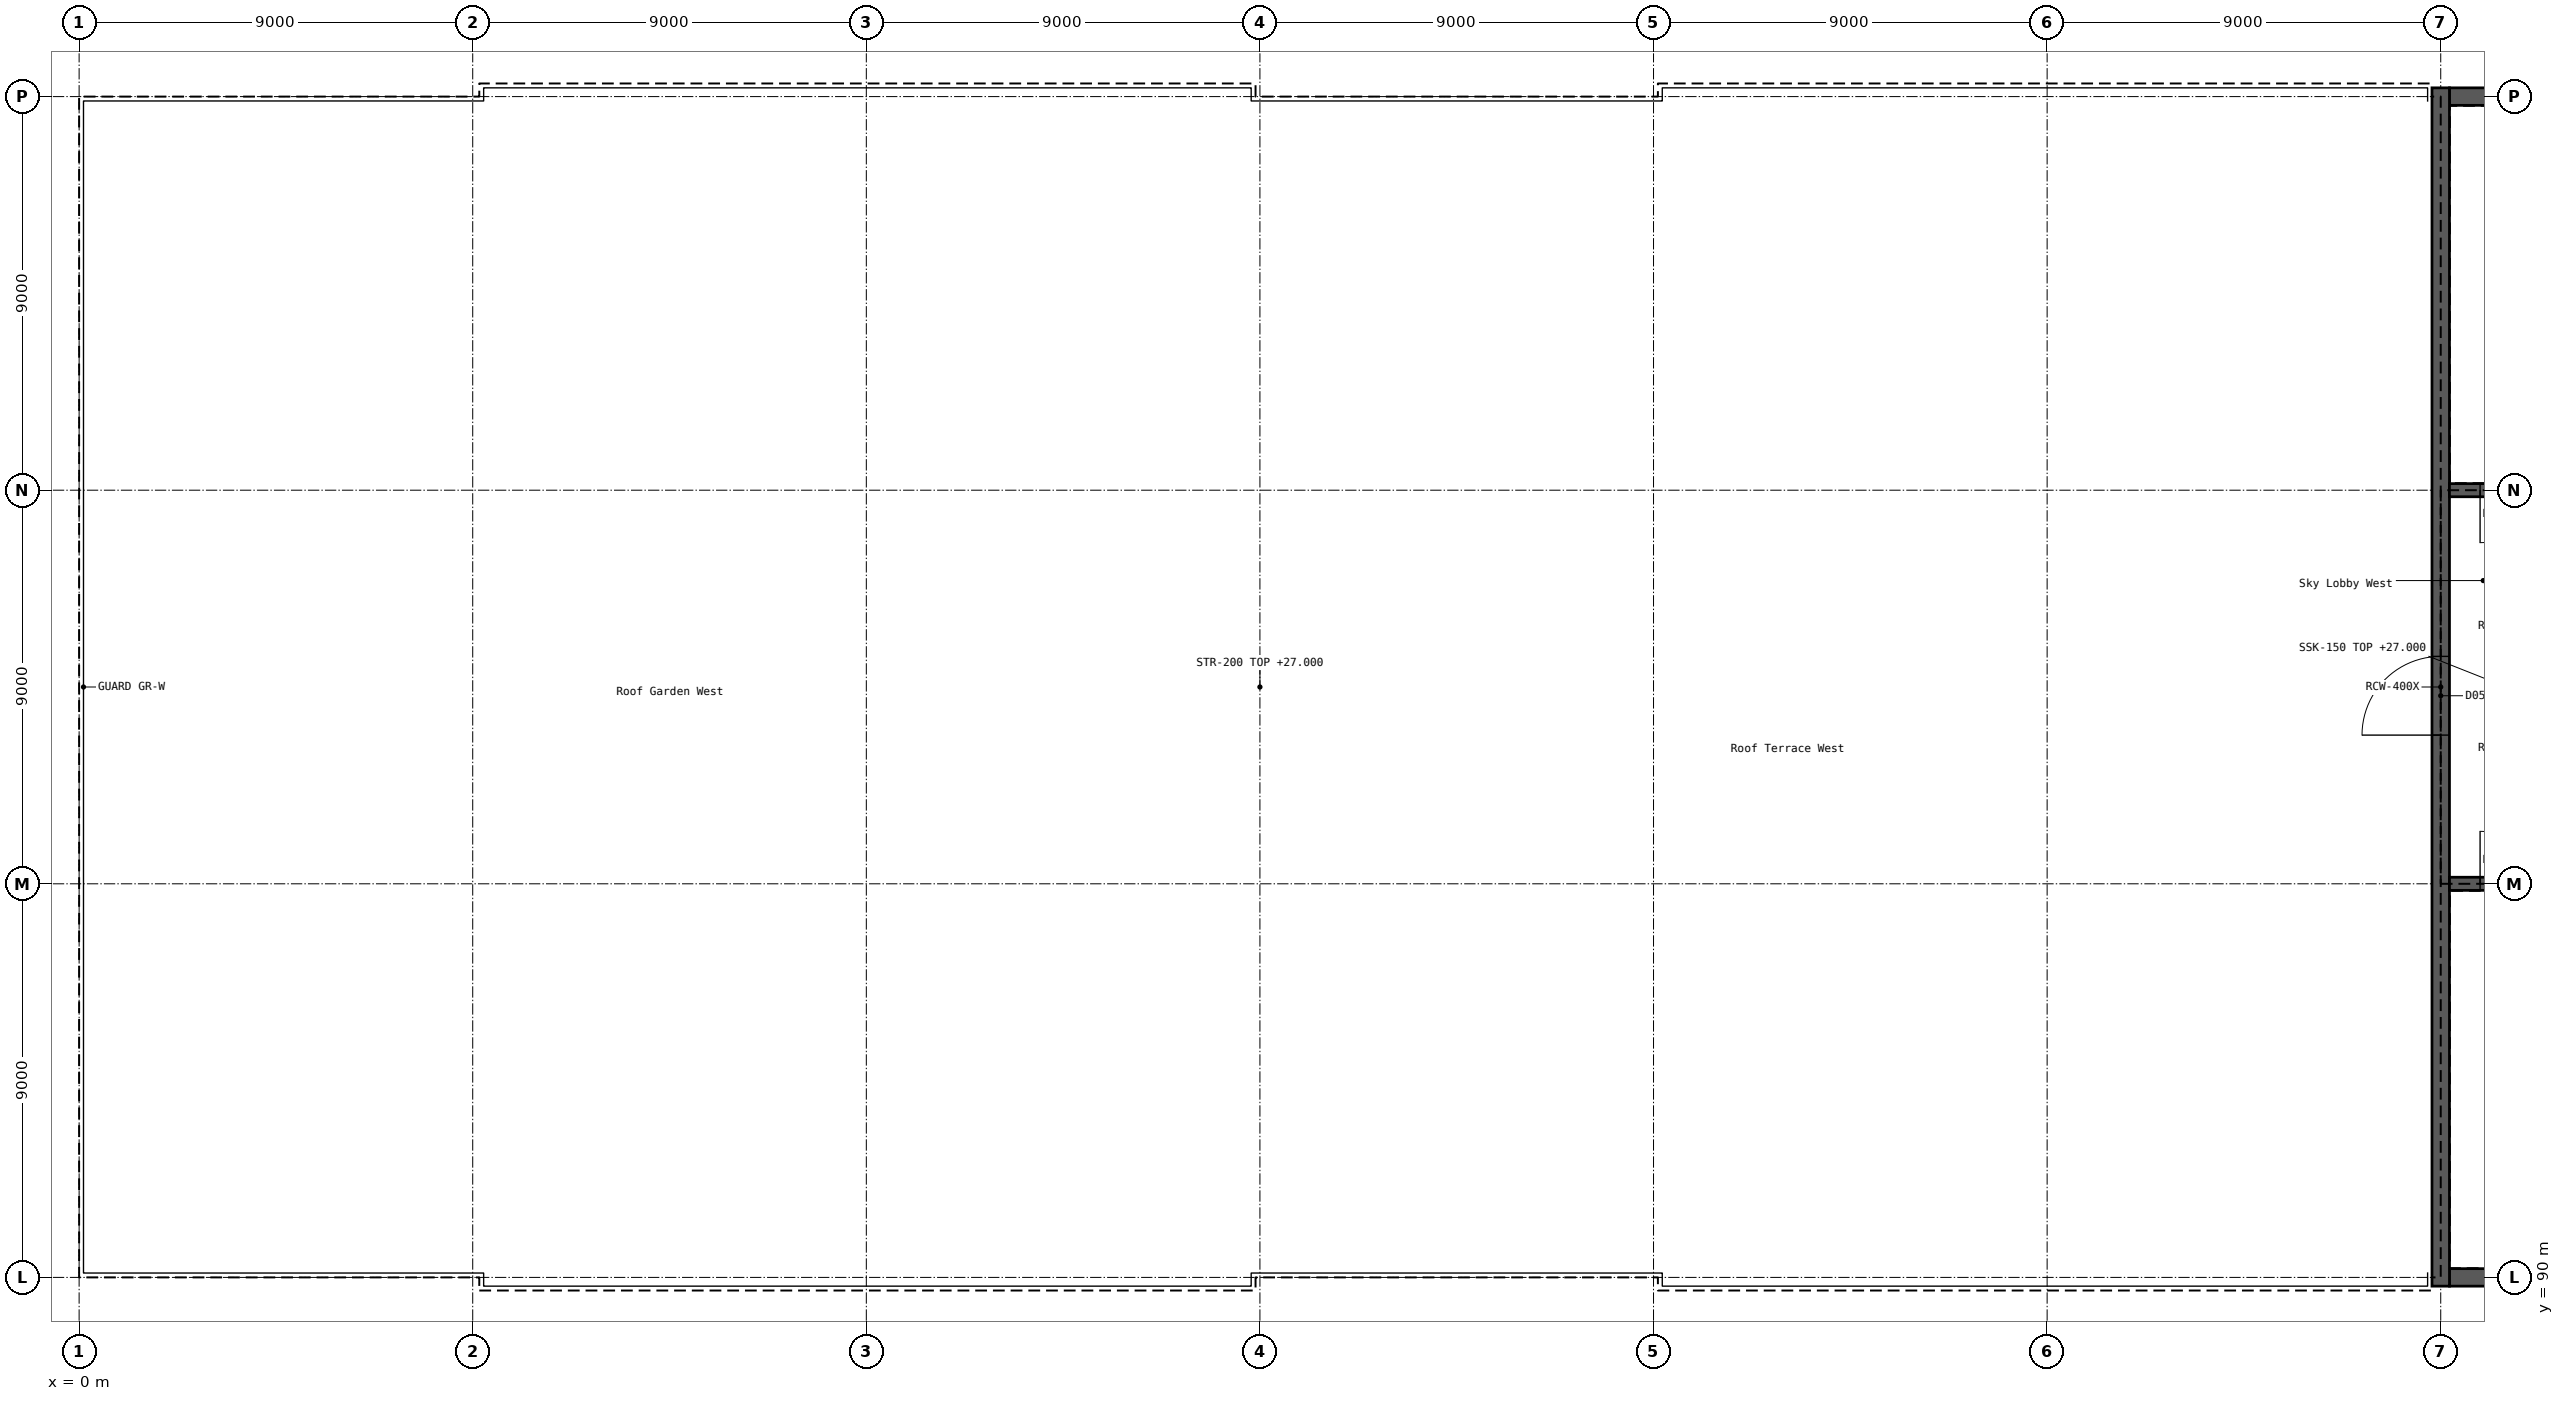
"""IFC4 building model, lengths in metres.
Left out: names, types, materials, properties, quantities, classifications, styles, units other than length and angle.
Written with IfcOpenShell. Run it as: python <this file> out.ifc"""

import sys

from ifc_helpers import new_model, si_unit, direction, frame, frame_2d, origin, place, context, subcontext, project, spatial, rectangle, extrude, element, fill, save


model = new_model("IFC4")
c1 = context("Model", 3, precision=1e-05, world=origin(), true_north=direction((0.0, 1.0)))
c2 = subcontext(c1, "Body", "Model", "MODEL_VIEW")
j1 = project(units=[si_unit("LENGTHUNIT", "METRE"), si_unit("PLANEANGLEUNIT", "RADIAN")], contexts=[c1])
p1 = place(None, origin())
s1 = spatial("IfcSite", under=j1, at=p1, CompositionType="ELEMENT")
p2 = place(p1, origin())
s2 = spatial("IfcBuilding", under=s1, at=p2, CompositionType="ELEMENT")
p3 = place(p2, frame((0.0, 0.0, 27.0)))
s3 = spatial("IfcBuildingStorey", under=s2, at=p3, CompositionType="ELEMENT", Elevation=27.0)
p4 = place(p3, frame((54.2, 90.0, 0.0), z_axis=(0.0, 0.0, 1.0), x_axis=(1.0, 0.0, 0.0)))
e1 = element("IfcWall", 1, at=p4, inside=s3, PredefinedType="SHEAR", context=c2, shape_type="SweptSolid", body=[
    extrude(rectangle(XDim=8.6, YDim=0.4, at=frame_2d((4.3, 0.0))), origin(), (0.0, 0.0, 1.0), 5.4),
])
p5 = place(p4, frame((3.75, 0.0, 1.5)))
e2 = element("IfcOpeningElement", 2, at=p5, cuts=e1, PredefinedType="OPENING", context=c2, shape_type="SweptSolid", body=[
    extrude(rectangle(XDim=1.5, YDim=1.8, at=frame_2d((0.75, 0.9))), frame((0.0, 0.211, 0.0), z_axis=(0.0, -1.0, 0.0), x_axis=(1.0, 0.0, 0.0)), (0.0, 0.0, 1.0), 0.422),
])
p6 = place(p3, frame((54.2, 117.0, 0.0), z_axis=(0.0, 0.0, 1.0), x_axis=(1.0, 0.0, 0.0)))
e3 = element("IfcWall", 3, at=p6, inside=s3, PredefinedType="SHEAR", context=c2, shape_type="SweptSolid", body=[
    extrude(rectangle(XDim=8.6, YDim=0.4, at=frame_2d((4.3, 0.0))), origin(), (0.0, 0.0, 1.0), 5.4),
])
p7 = place(p6, frame((3.75, 0.0, 1.5)))
e4 = element("IfcOpeningElement", 4, at=p7, cuts=e3, PredefinedType="OPENING", context=c2, shape_type="SweptSolid", body=[
    extrude(rectangle(XDim=1.5, YDim=1.8, at=frame_2d((0.75, 0.9))), frame((0.0, 0.211, 0.0), z_axis=(0.0, -1.0, 0.0), x_axis=(1.0, 0.0, 0.0)), (0.0, 0.0, 1.0), 0.422),
])
p8 = place(p3, frame((54.0, 89.8, 0.0), z_axis=(0.0, 0.0, 1.0), x_axis=(0.0, 1.0, 0.0)))
e5 = element("IfcWall", 5, at=p8, inside=s3, PredefinedType="SHEAR", context=c2, shape_type="SweptSolid", body=[
    extrude(rectangle(XDim=27.4, YDim=0.4, at=frame_2d((13.7, 0.0))), origin(), (0.0, 0.0, 1.0), 5.4),
])
p9 = place(p8, frame((12.6, 0.0, 0.0)))
e6 = element("IfcOpeningElement", 6, at=p9, cuts=e5, PredefinedType="OPENING", context=c2, shape_type="SweptSolid", body=[
    extrude(rectangle(XDim=1.8, YDim=2.1, at=frame_2d((0.9, 1.05))), frame((0.0, 0.211, 0.0), z_axis=(0.0, -1.0, 0.0), x_axis=(1.0, 0.0, 0.0)), (0.0, 0.0, 1.0), 0.422),
])
p10 = place(p3, frame((54.2, 99.0, 0.0), z_axis=(0.0, 0.0, 1.0), x_axis=(1.0, 0.0, 0.0)))
e7 = element("IfcWall", 7, at=p10, inside=s3, PredefinedType="SHEAR", context=c2, shape_type="SweptSolid", body=[
    extrude(rectangle(XDim=8.6, YDim=0.3, at=frame_2d((4.3, 0.0))), origin(), (0.0, 0.0, 1.0), 5.4),
])
p11 = place(p10, frame((0.7, 0.0, 0.0)))
e8 = element("IfcOpeningElement", 8, at=p11, cuts=e7, PredefinedType="OPENING", context=c2, shape_type="SweptSolid", body=[
    extrude(rectangle(XDim=1.2, YDim=2.1, at=frame_2d((0.6, 1.05))), frame((0.0, 0.161, 0.0), z_axis=(0.0, -1.0, 0.0), x_axis=(1.0, 0.0, 0.0)), (0.0, 0.0, 1.0), 0.322),
])
p12 = place(p3, frame((54.2, 108.0, 0.0), z_axis=(0.0, 0.0, 1.0), x_axis=(1.0, 0.0, 0.0)))
e9 = element("IfcWall", 9, at=p12, inside=s3, PredefinedType="SHEAR", context=c2, shape_type="SweptSolid", body=[
    extrude(rectangle(XDim=8.6, YDim=0.3, at=frame_2d((4.3, 0.0))), origin(), (0.0, 0.0, 1.0), 5.4),
])
p13 = place(p12, frame((0.7, 0.0, 0.0)))
e10 = element("IfcOpeningElement", 10, at=p13, cuts=e9, PredefinedType="OPENING", context=c2, shape_type="SweptSolid", body=[
    extrude(rectangle(XDim=1.2, YDim=2.1, at=frame_2d((0.6, 1.05))), frame((0.0, 0.161, 0.0), z_axis=(0.0, -1.0, 0.0), x_axis=(1.0, 0.0, 0.0)), (0.0, 0.0, 1.0), 0.322),
])
p14 = place(p9, origin())
e11 = element("IfcDoor", 11, at=p14, inside=s3, OperationType="DOUBLE_DOOR_DOUBLE_SWING", PredefinedType="DOOR", context=c2, shape_type="SweptSolid", body=[
    extrude(rectangle(XDim=1.8, YDim=2.1, at=frame_2d((0.9, 1.05))), frame((0.0, 0.025, 0.0), z_axis=(0.0, -1.0, 0.0), x_axis=(1.0, 0.0, 0.0)), (0.0, 0.0, 1.0), 0.05),
])
fill(e6, e11)
p15 = place(p11, origin())
e12 = element("IfcDoor", 12, at=p15, inside=s3, OperationType="SINGLE_SWING_LEFT", PredefinedType="DOOR", context=c2, shape_type="SweptSolid", body=[
    extrude(rectangle(XDim=1.2, YDim=2.1, at=frame_2d((0.6, 1.05))), frame((0.0, 0.025, 0.0), z_axis=(0.0, -1.0, 0.0), x_axis=(1.0, 0.0, 0.0)), (0.0, 0.0, 1.0), 0.05),
])
fill(e8, e12)
p16 = place(p13, frame((1.2, 0.0, 0.0), z_axis=(0.0, 0.0, 1.0), x_axis=(-1.0, 0.0, 0.0)))
e13 = element("IfcDoor", 13, at=p16, inside=s3, OperationType="SINGLE_SWING_RIGHT", PredefinedType="DOOR", context=c2, shape_type="SweptSolid", body=[
    extrude(rectangle(XDim=1.2, YDim=2.1, at=frame_2d((0.6, 1.05))), frame((0.0, 0.025, 0.0), z_axis=(0.0, -1.0, 0.0), x_axis=(1.0, 0.0, 0.0)), (0.0, 0.0, 1.0), 0.05),
])
fill(e10, e13)
save(model, sys.argv[1])
